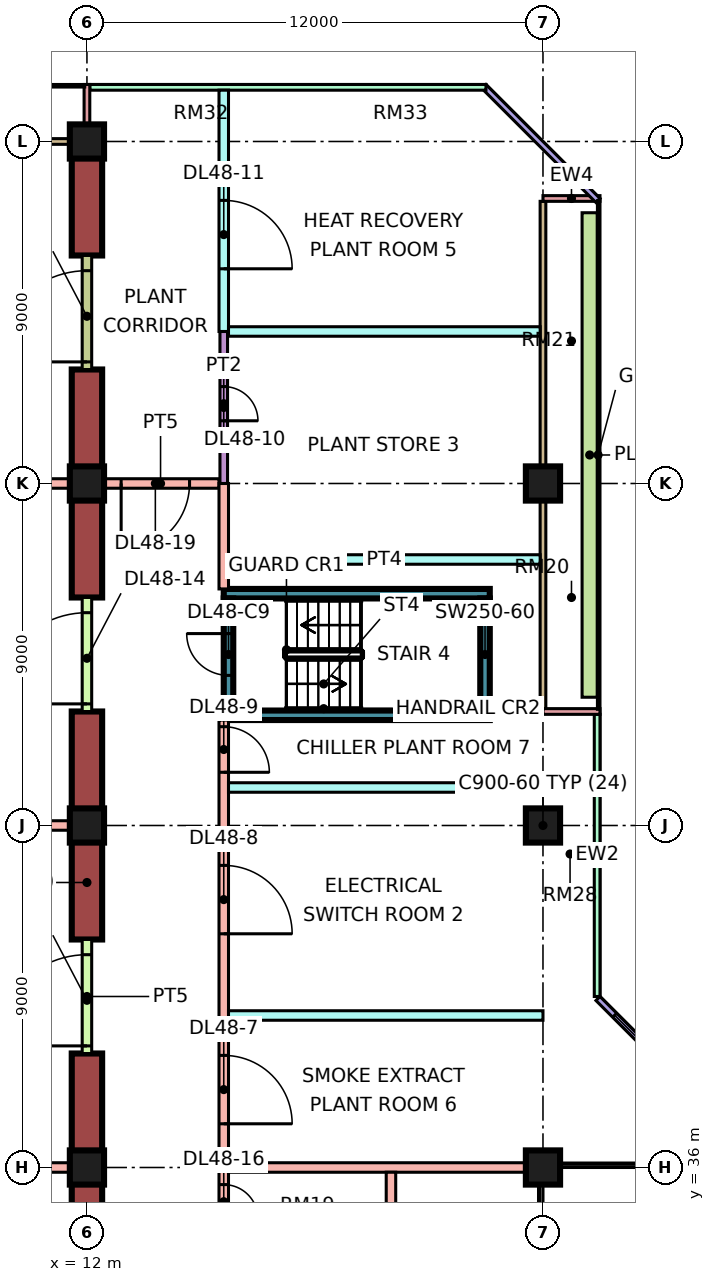
"""IFC4 building model, lengths in metres.
Left out: names, types, materials, properties, quantities, classifications, styles, units other than length and angle.
Written with IfcOpenShell. Run it as: python <this file> out.ifc"""

import sys

from ifc_helpers import new_model, si_unit, direction, frame, frame_2d, origin, origin_2d, place, context, subcontext, project, spatial, rectangle, extrude, element, fill, save


model = new_model("IFC4")
c1 = context("Model", 3, precision=1e-05, world=origin(), true_north=direction((0.0, 1.0)))
c2 = subcontext(c1, "Body", "Model", "MODEL_VIEW")
j1 = project(units=[si_unit("LENGTHUNIT", "METRE"), si_unit("PLANEANGLEUNIT", "RADIAN")], contexts=[c1])
p1 = place(None, origin())
s1 = spatial("IfcSite", under=j1, at=p1, CompositionType="ELEMENT")
p2 = place(p1, origin())
s2 = spatial("IfcBuilding", under=s1, at=p2, CompositionType="ELEMENT")
p3 = place(p2, frame((0.0, 0.0, 206.15)))
s3 = spatial("IfcBuildingStorey", under=s2, at=p3, CompositionType="ELEMENT", Elevation=206.15)
for number, where, z_axis, x_axis in (
    (1, (12.0, 36.0, 0.0), (0.0, 0.0, 1.0), (1.0, 0.0, 0.0)),
    (2, (12.0, 45.0, 0.0), (0.0, 0.0, 1.0), (1.0, 0.0, 0.0)),
    (3, (12.0, 54.0, 0.0), (0.0, 0.0, 1.0), (1.0, 0.0, 0.0)),
    (4, (12.0, 63.0, 0.0), (0.0, 0.0, 1.0), (1.0, 0.0, 0.0)),
    (5, (24.0, 36.0, 0.0), (0.0, 0.0, 1.0), (1.0, 0.0, 0.0)),
    (6, (24.0, 45.0, 0.0), (0.0, 0.0, 1.0), (1.0, 0.0, 0.0)),
    (7, (24.0, 54.0, 0.0), (0.0, 0.0, 1.0), (1.0, 0.0, 0.0)),
):
    element("IfcColumn", number, at=place(p3, frame(where, z_axis=z_axis, x_axis=x_axis)), inside=s3, PredefinedType="COLUMN", context=c2, shape_type="SweptSolid", body=[
        extrude(rectangle(XDim=0.9, YDim=0.9, at=origin_2d()), origin(), (0.0, 0.0, 1.0), 5.5),
    ])
for number, where, z_axis, x_axis in (
    (8, (15.6, 47.9, 0.0), (0.0, 0.0, 1.0), (1.0, 0.0, 0.0)),
    (9, (15.6, 51.1, 0.0), (0.0, 0.0, 1.0), (1.0, 0.0, 0.0)),
):
    element("IfcWall", number, at=place(p3, frame(where, z_axis=z_axis, x_axis=x_axis)), inside=s3, PredefinedType="SHEAR", context=c2, shape_type="SweptSolid", body=[
        extrude(rectangle(XDim=7.0, YDim=0.25, at=frame_2d((3.5, 0.0))), origin(), (0.0, 0.0, 1.0), 5.5),
    ])
p4 = place(p3, frame((15.725, 48.025, 0.0), z_axis=(0.0, 0.0, 1.0), x_axis=(0.0, 1.0, 0.0)))
e10 = element("IfcWall", 10, at=p4, inside=s3, PredefinedType="SHEAR", context=c2, shape_type="SweptSolid", body=[
    extrude(rectangle(XDim=2.95, YDim=0.25, at=frame_2d((1.475, 0.0))), origin(), (0.0, 0.0, 1.0), 5.5),
])
p5 = place(p4, frame((0.925, 0.0, 0.0)))
e11 = element("IfcOpeningElement", 11, at=p5, cuts=e10, PredefinedType="OPENING", context=c2, shape_type="SweptSolid", body=[
    extrude(rectangle(XDim=1.1, YDim=2.2, at=frame_2d((0.55, 1.1))), frame((0.0, 0.135, 0.0), z_axis=(0.0, -1.0, 0.0), x_axis=(1.0, 0.0, 0.0)), (0.0, 0.0, 1.0), 0.27),
])
p6 = place(p3, frame((22.475, 48.025, 0.0), z_axis=(0.0, 0.0, 1.0), x_axis=(0.0, 1.0, 0.0)))
e12 = element("IfcWall", 12, at=p6, inside=s3, PredefinedType="SHEAR", context=c2, shape_type="SweptSolid", body=[
    extrude(rectangle(XDim=2.95, YDim=0.25, at=frame_2d((1.475, 0.0))), origin(), (0.0, 0.0, 1.0), 5.5),
])
p7 = place(p3, frame((12.0, 31.5, 0.0), z_axis=(0.0, 0.0, 1.0), x_axis=(0.0, 1.0, 0.0)))
e13 = element("IfcWall", 13, at=p7, inside=s3, PredefinedType="SHEAR", context=c2, shape_type="SweptSolid", body=[
    extrude(rectangle(XDim=4.5, YDim=0.8, at=frame_2d((2.25, 0.0))), origin(), (0.0, 0.0, 1.0), 5.1),
])
for number, where, z_axis, x_axis in (
    (14, (12.0, 36.0, 0.0), (0.0, 0.0, 1.0), (0.0, 1.0, 0.0)),
    (15, (12.0, 42.0, 0.0), (0.0, 0.0, 1.0), (0.0, 1.0, 0.0)),
    (16, (12.0, 45.0, 0.0), (0.0, 0.0, 1.0), (0.0, 1.0, 0.0)),
    (17, (12.0, 51.0, 0.0), (0.0, 0.0, 1.0), (0.0, 1.0, 0.0)),
    (18, (12.0, 54.0, 0.0), (0.0, 0.0, 1.0), (0.0, 1.0, 0.0)),
    (19, (12.0, 60.0, 0.0), (0.0, 0.0, 1.0), (0.0, 1.0, 0.0)),
):
    element("IfcWall", number, at=place(p3, frame(where, z_axis=z_axis, x_axis=x_axis)), inside=s3, PredefinedType="SHEAR", context=c2, shape_type="SweptSolid", body=[
        extrude(rectangle(XDim=3.0, YDim=0.8, at=frame_2d((1.5, 0.0))), origin(), (0.0, 0.0, 1.0), 5.1),
    ])
p8 = place(p3, frame((28.447, 37.447, 0.0), z_axis=(0.0, 0.0, 1.0), x_axis=(-0.707106781187, 0.707106781187, 0.0)))
e20 = element("IfcWall", 20, at=p8, inside=s3, PredefinedType="SOLIDWALL", context=c2, shape_type="SweptSolid", body=[
    extrude(rectangle(XDim=4.243, YDim=0.15, at=frame_2d((2.121, 0.0))), origin(), (0.0, 0.0, 1.0), 5.1),
])
p9 = place(p8, frame((0.621, 0.0, 0.45)))
e21 = element("IfcOpeningElement", 21, at=p9, cuts=e20, PredefinedType="OPENING", context=c2, shape_type="SweptSolid", body=[
    extrude(rectangle(XDim=3.0, YDim=3.6, at=frame_2d((1.5, 1.8))), frame((0.0, 0.085, 0.0), z_axis=(0.0, -1.0, 0.0), x_axis=(1.0, 0.0, 0.0)), (0.0, 0.0, 1.0), 0.17),
])
p10 = place(p3, frame((25.425, 40.5, 0.0), z_axis=(0.0, 0.0, 1.0), x_axis=(0.0, 1.0, 0.0)))
e22 = element("IfcWall", 22, at=p10, inside=s3, PredefinedType="SOLIDWALL", context=c2, shape_type="SweptSolid", body=[
    extrude(rectangle(XDim=7.425, YDim=0.15, at=frame_2d((3.712, 0.0))), origin(), (0.0, 0.0, 1.0), 5.1),
])
p11 = place(p3, frame((24.0, 48.075, 0.0), z_axis=(0.0, 0.0, 1.0), x_axis=(0.0, 1.0, 0.0)))
e23 = element("IfcWall", 23, at=p11, inside=s3, PredefinedType="SOLIDWALL", context=c2, shape_type="SweptSolid", body=[
    extrude(rectangle(XDim=13.35, YDim=0.15, at=frame_2d((6.675, 0.0))), origin(), (0.0, 0.0, 1.0), 5.1),
])
for number, where, z_axis, x_axis in (
    (24, (25.5, 48.0, 0.0), (0.0, 0.0, 1.0), (-1.0, 0.0, 0.0)),
    (25, (25.5, 61.5, 0.0), (0.0, 0.0, 1.0), (-1.0, 0.0, 0.0)),
):
    element("IfcWall", number, at=place(p3, frame(where, z_axis=z_axis, x_axis=x_axis)), inside=s3, PredefinedType="SOLIDWALL", context=c2, shape_type="SweptSolid", body=[
        extrude(rectangle(XDim=1.5, YDim=0.15, at=frame_2d((0.75, 0.0))), origin(), (0.0, 0.0, 1.0), 5.1),
    ])
p12 = place(p3, frame((25.447, 61.447, 0.0), z_axis=(0.0, 0.0, 1.0), x_axis=(-0.707106781187, 0.707106781187, 0.0)))
e26 = element("IfcWall", 26, at=p12, inside=s3, PredefinedType="SOLIDWALL", context=c2, shape_type="SweptSolid", body=[
    extrude(rectangle(XDim=4.243, YDim=0.15, at=frame_2d((2.121, 0.0))), origin(), (0.0, 0.0, 1.0), 5.1),
])
p13 = place(p3, frame((22.5, 64.425, 0.0), z_axis=(0.0, 0.0, 1.0), x_axis=(-1.0, 0.0, 0.0)))
e27 = element("IfcWall", 27, at=p13, inside=s3, PredefinedType="SOLIDWALL", context=c2, shape_type="SweptSolid", body=[
    extrude(rectangle(XDim=10.425, YDim=0.15, at=frame_2d((5.212, 0.0))), origin(), (0.0, 0.0, 1.0), 5.1),
])
p14 = place(p3, frame((11.925, 63.0, 0.0), z_axis=(0.0, 0.0, 1.0), x_axis=(-1.0, 0.0, 0.0)))
e28 = element("IfcWall", 28, at=p14, inside=s3, PredefinedType="SOLIDWALL", context=c2, shape_type="SweptSolid", body=[
    extrude(rectangle(XDim=10.35, YDim=0.15, at=frame_2d((5.175, 0.0))), origin(), (0.0, 0.0, 1.0), 5.1),
])
p15 = place(p3, frame((12.0, 64.5, 0.0), z_axis=(0.0, 0.0, 1.0), x_axis=(0.0, -1.0, 0.0)))
e29 = element("IfcWall", 29, at=p15, inside=s3, PredefinedType="SOLIDWALL", context=c2, shape_type="SweptSolid", body=[
    extrude(rectangle(XDim=1.5, YDim=0.15, at=frame_2d((0.75, 0.0))), origin(), (0.0, 0.0, 1.0), 5.1),
])
p16 = place(p3, frame((25.229, 48.375, 0.0), z_axis=(0.0, 0.0, 1.0), x_axis=(0.0, 1.0, 0.0)))
e30 = element("IfcWall", 30, at=p16, inside=s3, PredefinedType="SOLIDWALL", context=c2, shape_type="SweptSolid", body=[
    extrude(rectangle(XDim=12.75, YDim=0.4, at=frame_2d((6.375, 0.0))), origin(), (0.0, 0.0, 1.0), 0.7),
])
p17 = place(p3, frame((0.0, 36.0, 0.0), z_axis=(0.0, 0.0, 1.0), x_axis=(1.0, 0.0, 0.0)))
e31 = element("IfcWall", 31, at=p17, inside=s3, PredefinedType="PARTITIONING", context=c2, shape_type="SweptSolid", body=[
    extrude(rectangle(XDim=11.601, YDim=0.25, at=frame_2d((5.801, 0.0))), origin(), (0.0, 0.0, 1.0), 5.1),
])
p18 = place(p3, frame((0.0, 45.0, 0.0), z_axis=(0.0, 0.0, 1.0), x_axis=(1.0, 0.0, 0.0)))
e32 = element("IfcWall", 32, at=p18, inside=s3, PredefinedType="PARTITIONING", context=c2, shape_type="SweptSolid", body=[
    extrude(rectangle(XDim=11.601, YDim=0.25, at=frame_2d((5.801, 0.0))), origin(), (0.0, 0.0, 1.0), 5.1),
])
p19 = place(p3, frame((0.074, 54.0, 0.0), z_axis=(0.0, 0.0, 1.0), x_axis=(1.0, 0.0, 0.0)))
e33 = element("IfcWall", 33, at=p19, inside=s3, PredefinedType="PARTITIONING", context=c2, shape_type="SweptSolid", body=[
    extrude(rectangle(XDim=11.527, YDim=0.25, at=frame_2d((5.764, 0.0))), origin(), (0.0, 0.0, 1.0), 5.1),
])
p20 = place(p3, frame((12.0, 38.999, 0.0), z_axis=(0.0, 0.0, 1.0), x_axis=(0.0, 1.0, 0.0)))
e34 = element("IfcWall", 34, at=p20, inside=s3, PredefinedType="PARTITIONING", context=c2, shape_type="SweptSolid", body=[
    extrude(rectangle(XDim=3.002, YDim=0.25, at=frame_2d((1.501, 0.0))), origin(), (0.0, 0.0, 1.0), 3.05),
])
p21 = place(p20, frame((0.201, 0.0, 0.0)))
e35 = element("IfcOpeningElement", 35, at=p21, cuts=e34, PredefinedType="OPENING", context=c2, shape_type="SweptSolid", body=[
    extrude(rectangle(XDim=2.4, YDim=2.1, at=frame_2d((1.2, 1.05))), frame((0.0, 0.135, 0.0), z_axis=(0.0, -1.0, 0.0), x_axis=(1.0, 0.0, 0.0)), (0.0, 0.0, 1.0), 0.27),
])
p22 = place(p3, frame((12.0, 47.999, 0.0), z_axis=(0.0, 0.0, 1.0), x_axis=(0.0, 1.0, 0.0)))
e36 = element("IfcWall", 36, at=p22, inside=s3, PredefinedType="PARTITIONING", context=c2, shape_type="SweptSolid", body=[
    extrude(rectangle(XDim=3.002, YDim=0.25, at=frame_2d((1.501, 0.0))), origin(), (0.0, 0.0, 1.0), 3.05),
])
p23 = place(p22, frame((0.201, 0.0, 0.0)))
e37 = element("IfcOpeningElement", 37, at=p23, cuts=e36, PredefinedType="OPENING", context=c2, shape_type="SweptSolid", body=[
    extrude(rectangle(XDim=2.4, YDim=2.1, at=frame_2d((1.2, 1.05))), frame((0.0, 0.135, 0.0), z_axis=(0.0, -1.0, 0.0), x_axis=(1.0, 0.0, 0.0)), (0.0, 0.0, 1.0), 0.27),
])
p24 = place(p3, frame((12.0, 56.999, 0.0), z_axis=(0.0, 0.0, 1.0), x_axis=(0.0, 1.0, 0.0)))
e38 = element("IfcWall", 38, at=p24, inside=s3, PredefinedType="PARTITIONING", context=c2, shape_type="SweptSolid", body=[
    extrude(rectangle(XDim=3.002, YDim=0.25, at=frame_2d((1.501, 0.0))), origin(), (0.0, 0.0, 1.0), 3.05),
])
p25 = place(p24, frame((0.201, 0.0, 0.0)))
e39 = element("IfcOpeningElement", 39, at=p25, cuts=e38, PredefinedType="OPENING", context=c2, shape_type="SweptSolid", body=[
    extrude(rectangle(XDim=2.4, YDim=2.1, at=frame_2d((1.2, 1.05))), frame((0.0, 0.135, 0.0), z_axis=(0.0, -1.0, 0.0), x_axis=(1.0, 0.0, 0.0)), (0.0, 0.0, 1.0), 0.27),
])
p26 = place(p3, frame((12.399, 54.0, 0.0), z_axis=(0.0, 0.0, 1.0), x_axis=(1.0, 0.0, 0.0)))
e40 = element("IfcWall", 40, at=p26, inside=s3, PredefinedType="PARTITIONING", context=c2, shape_type="SweptSolid", body=[
    extrude(rectangle(XDim=3.076, YDim=0.25, at=frame_2d((1.538, 0.0))), origin(), (0.0, 0.0, 1.0), 5.1),
])
p27 = place(p26, frame((0.501, 0.0, 0.0)))
e41 = element("IfcOpeningElement", 41, at=p27, cuts=e40, PredefinedType="OPENING", context=c2, shape_type="SweptSolid", body=[
    extrude(rectangle(XDim=1.8, YDim=2.1, at=frame_2d((0.9, 1.05))), frame((0.0, 0.135, 0.0), z_axis=(0.0, -1.0, 0.0), x_axis=(1.0, 0.0, 0.0)), (0.0, 0.0, 1.0), 0.27),
])
p28 = place(p3, frame((15.6, 20.0, 0.0), z_axis=(0.0, 0.0, 1.0), x_axis=(0.0, 1.0, 0.0)))
e42 = element("IfcWall", 42, at=p28, inside=s3, PredefinedType="PARTITIONING", context=c2, shape_type="SweptSolid", body=[
    extrude(rectangle(XDim=27.775, YDim=0.25, at=frame_2d((13.887, 0.0))), origin(), (0.0, 0.0, 1.0), 5.1),
])
p29 = place(p28, frame((17.15, 0.0, 0.0)))
e43 = element("IfcOpeningElement", 43, at=p29, cuts=e42, PredefinedType="OPENING", context=c2, shape_type="SweptSolid", body=[
    extrude(rectangle(XDim=1.8, YDim=2.1, at=frame_2d((0.9, 1.05))), frame((0.0, 0.135, 0.0), z_axis=(0.0, -1.0, 0.0), x_axis=(1.0, 0.0, 0.0)), (0.0, 0.0, 1.0), 0.27),
])
p30 = place(p28, frame((22.15, 0.0, 0.0)))
e44 = element("IfcOpeningElement", 44, at=p30, cuts=e42, PredefinedType="OPENING", context=c2, shape_type="SweptSolid", body=[
    extrude(rectangle(XDim=1.8, YDim=2.1, at=frame_2d((0.9, 1.05))), frame((0.0, 0.135, 0.0), z_axis=(0.0, -1.0, 0.0), x_axis=(1.0, 0.0, 0.0)), (0.0, 0.0, 1.0), 0.27),
])
p31 = place(p28, frame((26.4, 0.0, 0.0)))
e45 = element("IfcOpeningElement", 45, at=p31, cuts=e42, PredefinedType="OPENING", context=c2, shape_type="SweptSolid", body=[
    extrude(rectangle(XDim=1.2, YDim=2.1, at=frame_2d((0.6, 1.05))), frame((0.0, 0.135, 0.0), z_axis=(0.0, -1.0, 0.0), x_axis=(1.0, 0.0, 0.0)), (0.0, 0.0, 1.0), 0.27),
])
p32 = place(p28, frame((14.65, 0.0, 0.0)))
e46 = element("IfcOpeningElement", 46, at=p32, cuts=e42, PredefinedType="OPENING", context=c2, shape_type="SweptSolid", body=[
    extrude(rectangle(XDim=0.9, YDim=2.1, at=frame_2d((0.45, 1.05))), frame((0.0, 0.135, 0.0), z_axis=(0.0, -1.0, 0.0), x_axis=(1.0, 0.0, 0.0)), (0.0, 0.0, 1.0), 0.27),
])
p33 = place(p28, frame((11.4, 0.0, 0.0)))
e47 = element("IfcOpeningElement", 47, at=p33, cuts=e42, PredefinedType="OPENING", context=c2, shape_type="SweptSolid", body=[
    extrude(rectangle(XDim=0.9, YDim=2.1, at=frame_2d((0.45, 1.05))), frame((0.0, 0.135, 0.0), z_axis=(0.0, -1.0, 0.0), x_axis=(1.0, 0.0, 0.0)), (0.0, 0.0, 1.0), 0.27),
])
p34 = place(p3, frame((15.6, 51.225, 0.0), z_axis=(0.0, 0.0, 1.0), x_axis=(0.0, 1.0, 0.0)))
e48 = element("IfcWall", 48, at=p34, inside=s3, PredefinedType="PARTITIONING", context=c2, shape_type="SweptSolid", body=[
    extrude(rectangle(XDim=2.775, YDim=0.25, at=frame_2d((1.387, 0.0))), origin(), (0.0, 0.0, 1.0), 5.1),
])
p35 = place(p3, frame((15.6, 54.0, 0.0), z_axis=(0.0, 0.0, 1.0), x_axis=(0.0, 1.0, 0.0)))
e49 = element("IfcWall", 49, at=p35, inside=s3, PredefinedType="PARTITIONING", context=c2, shape_type="SweptSolid", body=[
    extrude(rectangle(XDim=4.0, YDim=0.2, at=frame_2d((2.0, 0.0))), origin(), (0.0, 0.0, 1.0), 5.1),
])
p36 = place(p35, frame((1.65, 0.0, 0.0)))
e50 = element("IfcOpeningElement", 50, at=p36, cuts=e49, PredefinedType="OPENING", context=c2, shape_type="SweptSolid", body=[
    extrude(rectangle(XDim=0.9, YDim=2.1, at=frame_2d((0.45, 1.05))), frame((0.0, 0.11, 0.0), z_axis=(0.0, -1.0, 0.0), x_axis=(1.0, 0.0, 0.0)), (0.0, 0.0, 1.0), 0.22),
])
p37 = place(p3, frame((15.6, 58.0, 0.0), z_axis=(0.0, 0.0, 1.0), x_axis=(0.0, 1.0, 0.0)))
e51 = element("IfcWall", 51, at=p37, inside=s3, PredefinedType="PARTITIONING", context=c2, shape_type="SweptSolid", body=[
    extrude(rectangle(XDim=6.35, YDim=0.25, at=frame_2d((3.175, 0.0))), origin(), (0.0, 0.0, 1.0), 5.1),
])
p38 = place(p37, frame((1.65, 0.0, 0.0)))
e52 = element("IfcOpeningElement", 52, at=p38, cuts=e51, PredefinedType="OPENING", context=c2, shape_type="SweptSolid", body=[
    extrude(rectangle(XDim=1.8, YDim=2.1, at=frame_2d((0.9, 1.05))), frame((0.0, 0.135, 0.0), z_axis=(0.0, -1.0, 0.0), x_axis=(1.0, 0.0, 0.0)), (0.0, 0.0, 1.0), 0.27),
])
for number, where, z_axis, x_axis in (
    (53, (15.725, 36.0, 0.0), (0.0, 0.0, 1.0), (1.0, 0.0, 0.0)),
    (54, (15.725, 40.0, 0.0), (0.0, 0.0, 1.0), (1.0, 0.0, 0.0)),
):
    element("IfcWall", number, at=place(p3, frame(where, z_axis=z_axis, x_axis=x_axis)), inside=s3, PredefinedType="PARTITIONING", context=c2, shape_type="SweptSolid", body=[
        extrude(rectangle(XDim=8.275, YDim=0.25, at=frame_2d((4.137, 0.0))), origin(), (0.0, 0.0, 1.0), 5.1),
    ])
p39 = place(p3, frame((15.725, 46.0, 0.0), z_axis=(0.0, 0.0, 1.0), x_axis=(1.0, 0.0, 0.0)))
e55 = element("IfcWall", 55, at=p39, inside=s3, PredefinedType="PARTITIONING", context=c2, shape_type="SweptSolid", body=[
    extrude(rectangle(XDim=9.625, YDim=0.25, at=frame_2d((4.812, 0.0))), origin(), (0.0, 0.0, 1.0), 5.1),
])
for number, where, z_axis, x_axis in (
    (56, (15.725, 52.0, 0.0), (0.0, 0.0, 1.0), (1.0, 0.0, 0.0)),
    (57, (15.725, 58.0, 0.0), (0.0, 0.0, 1.0), (1.0, 0.0, 0.0)),
):
    element("IfcWall", number, at=place(p3, frame(where, z_axis=z_axis, x_axis=x_axis)), inside=s3, PredefinedType="PARTITIONING", context=c2, shape_type="SweptSolid", body=[
        extrude(rectangle(XDim=8.201, YDim=0.25, at=frame_2d((4.101, 0.0))), origin(), (0.0, 0.0, 1.0), 5.1),
    ])
p40 = place(p3, frame((20.0, 23.875, 0.0), z_axis=(0.0, 0.0, 1.0), x_axis=(0.0, 1.0, 0.0)))
e58 = element("IfcWall", 58, at=p40, inside=s3, PredefinedType="PARTITIONING", context=c2, shape_type="SweptSolid", body=[
    extrude(rectangle(XDim=12.0, YDim=0.25, at=frame_2d((6.0, 0.0))), origin(), (0.0, 0.0, 1.0), 5.1),
])
p41 = place(p40, frame((2.325, 0.0, 0.0)))
e59 = element("IfcOpeningElement", 59, at=p41, cuts=e58, PredefinedType="OPENING", context=c2, shape_type="SweptSolid", body=[
    extrude(rectangle(XDim=0.9, YDim=2.1, at=frame_2d((0.45, 1.05))), frame((0.0, 0.135, 0.0), z_axis=(0.0, -1.0, 0.0), x_axis=(1.0, 0.0, 0.0)), (0.0, 0.0, 1.0), 0.27),
])
p42 = place(p9, origin())
e60 = element("IfcWindow", 60, at=p42, inside=s3, PartitioningType="SINGLE_PANEL", PredefinedType="WINDOW", context=c2, shape_type="SweptSolid", body=[
    extrude(rectangle(XDim=3.0, YDim=3.6, at=frame_2d((1.5, 1.8))), frame((0.0, 0.03, 0.0), z_axis=(0.0, -1.0, 0.0), x_axis=(1.0, 0.0, 0.0)), (0.0, 0.0, 1.0), 0.06),
])
fill(e21, e60)
p43 = place(p5, frame((1.1, 0.0, 0.0), z_axis=(0.0, 0.0, 1.0), x_axis=(-1.0, 0.0, 0.0)))
e61 = element("IfcDoor", 61, at=p43, inside=s3, OperationType="SINGLE_SWING_RIGHT", PredefinedType="DOOR", context=c2, shape_type="SweptSolid", body=[
    extrude(rectangle(XDim=1.1, YDim=2.2, at=frame_2d((0.55, 1.1))), frame((0.0, 0.025, 0.0), z_axis=(0.0, -1.0, 0.0), x_axis=(1.0, 0.0, 0.0)), (0.0, 0.0, 1.0), 0.05),
])
fill(e11, e61)
p44 = place(p29, frame((1.8, 0.0, 0.0), z_axis=(0.0, 0.0, 1.0), x_axis=(-1.0, 0.0, 0.0)))
e62 = element("IfcDoor", 62, at=p44, inside=s3, OperationType="DOUBLE_DOOR_SINGLE_SWING", PredefinedType="DOOR", context=c2, shape_type="SweptSolid", body=[
    extrude(rectangle(XDim=1.8, YDim=2.1, at=frame_2d((0.9, 1.05))), frame((0.0, 0.025, 0.0), z_axis=(0.0, -1.0, 0.0), x_axis=(1.0, 0.0, 0.0)), (0.0, 0.0, 1.0), 0.05),
])
fill(e43, e62)
p45 = place(p30, frame((1.8, 0.0, 0.0), z_axis=(0.0, 0.0, 1.0), x_axis=(-1.0, 0.0, 0.0)))
e63 = element("IfcDoor", 63, at=p45, inside=s3, OperationType="DOUBLE_DOOR_SINGLE_SWING", PredefinedType="DOOR", context=c2, shape_type="SweptSolid", body=[
    extrude(rectangle(XDim=1.8, YDim=2.1, at=frame_2d((0.9, 1.05))), frame((0.0, 0.025, 0.0), z_axis=(0.0, -1.0, 0.0), x_axis=(1.0, 0.0, 0.0)), (0.0, 0.0, 1.0), 0.05),
])
fill(e44, e63)
p46 = place(p31, frame((1.2, 0.0, 0.0), z_axis=(0.0, 0.0, 1.0), x_axis=(-1.0, 0.0, 0.0)))
e64 = element("IfcDoor", 64, at=p46, inside=s3, OperationType="SINGLE_SWING_LEFT", PredefinedType="DOOR", context=c2, shape_type="SweptSolid", body=[
    extrude(rectangle(XDim=1.2, YDim=2.1, at=frame_2d((0.6, 1.05))), frame((0.0, 0.025, 0.0), z_axis=(0.0, -1.0, 0.0), x_axis=(1.0, 0.0, 0.0)), (0.0, 0.0, 1.0), 0.05),
])
fill(e45, e64)
p47 = place(p36, frame((0.9, 0.0, 0.0), z_axis=(0.0, 0.0, 1.0), x_axis=(-1.0, 0.0, 0.0)))
e65 = element("IfcDoor", 65, at=p47, inside=s3, OperationType="SINGLE_SWING_LEFT", PredefinedType="DOOR", context=c2, shape_type="SweptSolid", body=[
    extrude(rectangle(XDim=0.9, YDim=2.1, at=frame_2d((0.45, 1.05))), frame((0.0, 0.025, 0.0), z_axis=(0.0, -1.0, 0.0), x_axis=(1.0, 0.0, 0.0)), (0.0, 0.0, 1.0), 0.05),
])
fill(e50, e65)
p48 = place(p38, frame((1.8, 0.0, 0.0), z_axis=(0.0, 0.0, 1.0), x_axis=(-1.0, 0.0, 0.0)))
e66 = element("IfcDoor", 66, at=p48, inside=s3, OperationType="DOUBLE_DOOR_SINGLE_SWING", PredefinedType="DOOR", context=c2, shape_type="SweptSolid", body=[
    extrude(rectangle(XDim=1.8, YDim=2.1, at=frame_2d((0.9, 1.05))), frame((0.0, 0.025, 0.0), z_axis=(0.0, -1.0, 0.0), x_axis=(1.0, 0.0, 0.0)), (0.0, 0.0, 1.0), 0.05),
])
fill(e52, e66)
p49 = place(p21, origin())
e67 = element("IfcDoor", 67, at=p49, inside=s3, OperationType="DOUBLE_DOOR_SINGLE_SWING", PredefinedType="DOOR", context=c2, shape_type="SweptSolid", body=[
    extrude(rectangle(XDim=2.4, YDim=2.1, at=frame_2d((1.2, 1.05))), frame((0.0, 0.025, 0.0), z_axis=(0.0, -1.0, 0.0), x_axis=(1.0, 0.0, 0.0)), (0.0, 0.0, 1.0), 0.05),
])
fill(e35, e67)
p50 = place(p23, origin())
e68 = element("IfcDoor", 68, at=p50, inside=s3, OperationType="DOUBLE_DOOR_SINGLE_SWING", PredefinedType="DOOR", context=c2, shape_type="SweptSolid", body=[
    extrude(rectangle(XDim=2.4, YDim=2.1, at=frame_2d((1.2, 1.05))), frame((0.0, 0.025, 0.0), z_axis=(0.0, -1.0, 0.0), x_axis=(1.0, 0.0, 0.0)), (0.0, 0.0, 1.0), 0.05),
])
fill(e37, e68)
p51 = place(p25, origin())
e69 = element("IfcDoor", 69, at=p51, inside=s3, OperationType="DOUBLE_DOOR_SINGLE_SWING", PredefinedType="DOOR", context=c2, shape_type="SweptSolid", body=[
    extrude(rectangle(XDim=2.4, YDim=2.1, at=frame_2d((1.2, 1.05))), frame((0.0, 0.025, 0.0), z_axis=(0.0, -1.0, 0.0), x_axis=(1.0, 0.0, 0.0)), (0.0, 0.0, 1.0), 0.05),
])
fill(e39, e69)
p52 = place(p32, frame((0.9, 0.0, 0.0), z_axis=(0.0, 0.0, 1.0), x_axis=(-1.0, 0.0, 0.0)))
e70 = element("IfcDoor", 70, at=p52, inside=s3, OperationType="SINGLE_SWING_LEFT", PredefinedType="DOOR", context=c2, shape_type="SweptSolid", body=[
    extrude(rectangle(XDim=0.9, YDim=2.1, at=frame_2d((0.45, 1.05))), frame((0.0, 0.025, 0.0), z_axis=(0.0, -1.0, 0.0), x_axis=(1.0, 0.0, 0.0)), (0.0, 0.0, 1.0), 0.05),
])
fill(e46, e70)
p53 = place(p27, frame((1.8, 0.0, 0.0), z_axis=(0.0, 0.0, 1.0), x_axis=(-1.0, 0.0, 0.0)))
e71 = element("IfcDoor", 71, at=p53, inside=s3, OperationType="DOUBLE_DOOR_SINGLE_SWING", PredefinedType="DOOR", context=c2, shape_type="SweptSolid", body=[
    extrude(rectangle(XDim=1.8, YDim=2.1, at=frame_2d((0.9, 1.05))), frame((0.0, 0.025, 0.0), z_axis=(0.0, -1.0, 0.0), x_axis=(1.0, 0.0, 0.0)), (0.0, 0.0, 1.0), 0.05),
])
fill(e41, e71)
save(model, sys.argv[1])
